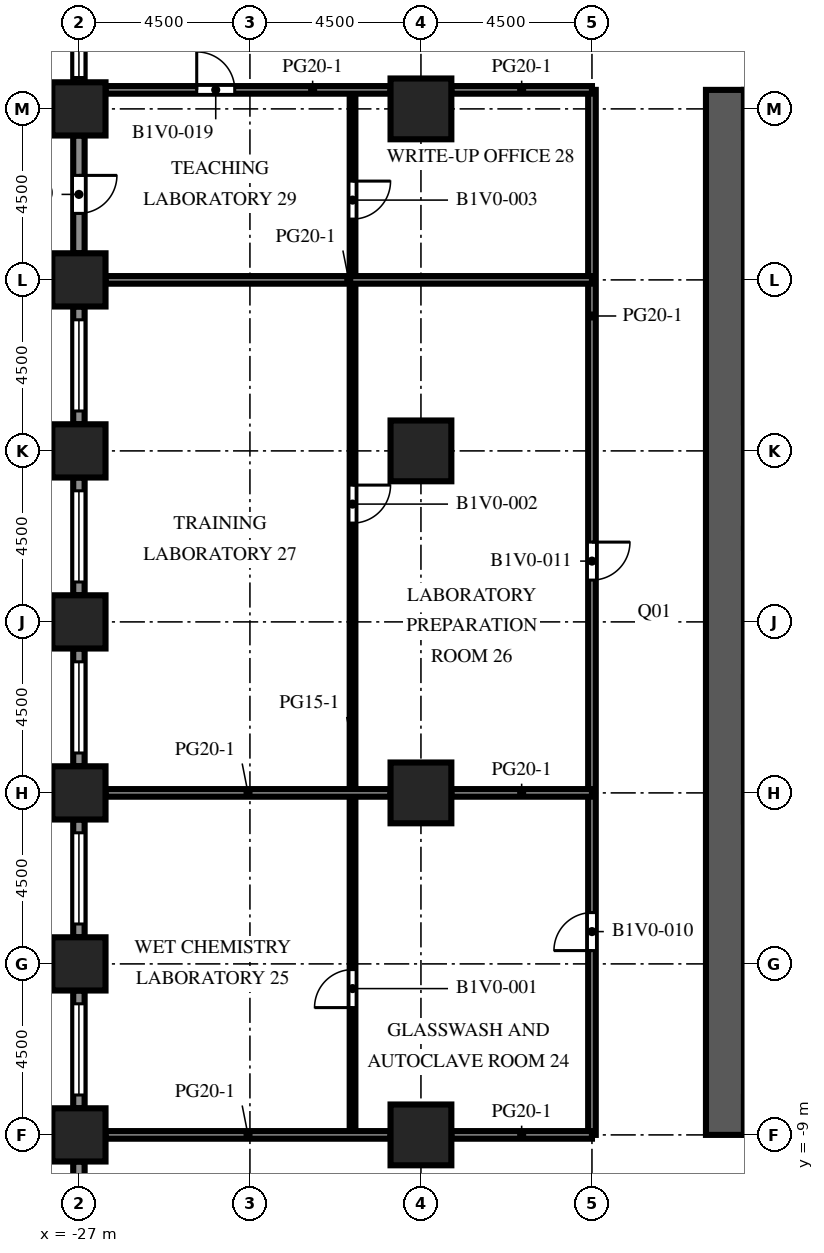
"""IFC4 building model, lengths in metres.
Left out: names, types, materials, properties, quantities, classifications, styles, units other than length and angle.
Written with IfcOpenShell. Run it as: python <this file> out.ifc"""

import sys

from ifc_helpers import new_model, si_unit, direction, frame, frame_2d, origin, origin_2d, place, context, subcontext, project, spatial, rectangle, extrude, element, fill, save


model = new_model("IFC4")
c1 = context("Model", 3, precision=1e-05, world=origin(), true_north=direction((0.0, 1.0)))
c2 = subcontext(c1, "Body", "Model", "MODEL_VIEW")
j1 = project(units=[si_unit("LENGTHUNIT", "METRE"), si_unit("PLANEANGLEUNIT", "RADIAN")], contexts=[c1])
p1 = place(None, origin())
s1 = spatial("IfcSite", under=j1, at=p1, CompositionType="ELEMENT")
p2 = place(p1, origin())
s2 = spatial("IfcBuilding", under=s1, at=p2, CompositionType="ELEMENT")
p3 = place(p2, frame((0.0, 0.0, 11.3)))
s3 = spatial("IfcBuildingStorey", under=s2, at=p3, CompositionType="ELEMENT", Elevation=11.3)
for number, where, z_axis, x_axis in (
    (1, (-27.0, -9.0, 0.0), (0.0, 0.0, 1.0), (1.0, 0.0, 0.0)),
    (2, (-27.0, -4.5, 0.0), (0.0, 0.0, 1.0), (1.0, 0.0, 0.0)),
    (3, (-27.0, 0.0, 0.0), (0.0, 0.0, 1.0), (1.0, 0.0, 0.0)),
    (4, (-27.0, 4.5, 0.0), (0.0, 0.0, 1.0), (1.0, 0.0, 0.0)),
    (5, (-27.0, 9.0, 0.0), (0.0, 0.0, 1.0), (1.0, 0.0, 0.0)),
    (6, (-27.0, 13.5, 0.0), (0.0, 0.0, 1.0), (1.0, 0.0, 0.0)),
    (7, (-27.0, 18.0, 0.0), (0.0, 0.0, 1.0), (1.0, 0.0, 0.0)),
):
    element("IfcColumn", number, at=place(p3, frame(where, z_axis=z_axis, x_axis=x_axis)), inside=s3, PredefinedType="COLUMN", context=c2, shape_type="SweptSolid", body=[
        extrude(rectangle(XDim=1.4, YDim=1.4, at=origin_2d()), origin(), (0.0, 0.0, 1.0), 4.1),
    ])
for number, where, z_axis, x_axis in (
    (8, (-18.0, -9.0, 0.0), (0.0, 0.0, 1.0), (1.0, 0.0, 0.0)),
    (9, (-18.0, 0.0, 0.0), (0.0, 0.0, 1.0), (1.0, 0.0, 0.0)),
    (10, (-18.0, 9.0, 0.0), (0.0, 0.0, 1.0), (1.0, 0.0, 0.0)),
    (11, (-18.0, 18.0, 0.0), (0.0, 0.0, 1.0), (1.0, 0.0, 0.0)),
):
    element("IfcColumn", number, at=place(p3, frame(where, z_axis=z_axis, x_axis=x_axis)), inside=s3, PredefinedType="COLUMN", context=c2, shape_type="SweptSolid", body=[
        extrude(rectangle(XDim=1.6, YDim=1.6, at=origin_2d()), origin(), (0.0, 0.0, 1.0), 4.1),
    ])
p4 = place(p3, frame((-10.0, -9.0, 0.0), z_axis=(0.0, 0.0, 1.0), x_axis=(0.0, 1.0, 0.0)))
e12 = element("IfcWall", 12, at=p4, inside=s3, PredefinedType="SHEAR", context=c2, shape_type="SweptSolid", body=[
    extrude(rectangle(XDim=27.5, YDim=1.0, at=frame_2d((13.75, 0.0))), origin(), (0.0, 0.0, 1.0), 4.1),
])
p5 = place(p4, frame((12.55, 0.0, 0.0)))
e13 = element("IfcOpeningElement", 13, at=p5, cuts=e12, PredefinedType="OPENING", context=c2, shape_type="SweptSolid", body=[
    extrude(rectangle(XDim=2.4, YDim=2.4, at=frame_2d((1.2, 1.2))), frame((0.0, 0.51, 0.0), z_axis=(0.0, -1.0, 0.0), x_axis=(1.0, 0.0, 0.0)), (0.0, 0.0, 1.0), 1.02),
])
p6 = place(p4, frame((6.825, 0.0, 0.0)))
e14 = element("IfcOpeningElement", 14, at=p6, cuts=e12, PredefinedType="OPENING", context=c2, shape_type="SweptSolid", body=[
    extrude(rectangle(XDim=1.2, YDim=2.1, at=frame_2d((0.6, 1.05))), frame((0.0, 0.51, 0.0), z_axis=(0.0, -1.0, 0.0), x_axis=(1.0, 0.0, 0.0)), (0.0, 0.0, 1.0), 1.02),
])
p7 = place(p4, frame((19.475, 0.0, 0.0)))
e15 = element("IfcOpeningElement", 15, at=p7, cuts=e12, PredefinedType="OPENING", context=c2, shape_type="SweptSolid", body=[
    extrude(rectangle(XDim=1.2, YDim=2.1, at=frame_2d((0.6, 1.05))), frame((0.0, 0.51, 0.0), z_axis=(0.0, -1.0, 0.0), x_axis=(1.0, 0.0, 0.0)), (0.0, 0.0, 1.0), 1.02),
])
p8 = place(p3, frame((-27.0, 18.7, 0.0), z_axis=(0.0, 0.0, 1.0), x_axis=(0.0, 1.0, 0.0)))
e16 = element("IfcWall", 16, at=p8, inside=s3, PredefinedType="SOLIDWALL", context=c2, shape_type="SweptSolid", body=[
    extrude(rectangle(XDim=3.1, YDim=0.3, at=frame_2d((1.55, 0.0))), origin(), (0.0, 0.0, 1.0), 2.75),
])
p9 = place(p8, frame((0.125, 0.0, 0.8)))
e17 = element("IfcOpeningElement", 17, at=p9, cuts=e16, PredefinedType="OPENING", context=c2, shape_type="SweptSolid", body=[
    extrude(rectangle(XDim=2.4, YDim=1.7, at=frame_2d((1.2, 0.85))), frame((0.0, 0.16, 0.0), z_axis=(0.0, -1.0, 0.0), x_axis=(1.0, 0.0, 0.0)), (0.0, 0.0, 1.0), 0.32),
])
p10 = place(p3, frame((-27.0, 14.2, 0.0), z_axis=(0.0, 0.0, 1.0), x_axis=(0.0, 1.0, 0.0)))
e18 = element("IfcWall", 18, at=p10, inside=s3, PredefinedType="SOLIDWALL", context=c2, shape_type="SweptSolid", body=[
    extrude(rectangle(XDim=3.1, YDim=0.3, at=frame_2d((1.55, 0.0))), origin(), (0.0, 0.0, 1.0), 2.75),
])
p11 = place(p10, frame((1.05, 0.0, 0.0)))
e19 = element("IfcOpeningElement", 19, at=p11, cuts=e18, PredefinedType="OPENING", context=c2, shape_type="SweptSolid", body=[
    extrude(rectangle(XDim=1.0, YDim=2.2, at=frame_2d((0.5, 1.1))), frame((0.0, 0.16, 0.0), z_axis=(0.0, -1.0, 0.0), x_axis=(1.0, 0.0, 0.0)), (0.0, 0.0, 1.0), 0.32),
])
p12 = place(p3, frame((-27.0, 9.7, 0.0), z_axis=(0.0, 0.0, 1.0), x_axis=(0.0, 1.0, 0.0)))
e20 = element("IfcWall", 20, at=p12, inside=s3, PredefinedType="SOLIDWALL", context=c2, shape_type="SweptSolid", body=[
    extrude(rectangle(XDim=3.1, YDim=0.3, at=frame_2d((1.55, 0.0))), origin(), (0.0, 0.0, 1.0), 2.75),
])
p13 = place(p12, frame((0.35, 0.0, 0.8)))
e21 = element("IfcOpeningElement", 21, at=p13, cuts=e20, PredefinedType="OPENING", context=c2, shape_type="SweptSolid", body=[
    extrude(rectangle(XDim=2.4, YDim=1.7, at=frame_2d((1.2, 0.85))), frame((0.0, 0.16, 0.0), z_axis=(0.0, -1.0, 0.0), x_axis=(1.0, 0.0, 0.0)), (0.0, 0.0, 1.0), 0.32),
])
p14 = place(p3, frame((-27.0, 5.2, 0.0), z_axis=(0.0, 0.0, 1.0), x_axis=(0.0, 1.0, 0.0)))
e22 = element("IfcWall", 22, at=p14, inside=s3, PredefinedType="SOLIDWALL", context=c2, shape_type="SweptSolid", body=[
    extrude(rectangle(XDim=3.1, YDim=0.3, at=frame_2d((1.55, 0.0))), origin(), (0.0, 0.0, 1.0), 2.75),
])
p15 = place(p14, frame((0.35, 0.0, 0.8)))
e23 = element("IfcOpeningElement", 23, at=p15, cuts=e22, PredefinedType="OPENING", context=c2, shape_type="SweptSolid", body=[
    extrude(rectangle(XDim=2.4, YDim=1.7, at=frame_2d((1.2, 0.85))), frame((0.0, 0.16, 0.0), z_axis=(0.0, -1.0, 0.0), x_axis=(1.0, 0.0, 0.0)), (0.0, 0.0, 1.0), 0.32),
])
p16 = place(p3, frame((-27.0, 0.7, 0.0), z_axis=(0.0, 0.0, 1.0), x_axis=(0.0, 1.0, 0.0)))
e24 = element("IfcWall", 24, at=p16, inside=s3, PredefinedType="SOLIDWALL", context=c2, shape_type="SweptSolid", body=[
    extrude(rectangle(XDim=3.1, YDim=0.3, at=frame_2d((1.55, 0.0))), origin(), (0.0, 0.0, 1.0), 2.75),
])
p17 = place(p16, frame((0.35, 0.0, 0.8)))
e25 = element("IfcOpeningElement", 25, at=p17, cuts=e24, PredefinedType="OPENING", context=c2, shape_type="SweptSolid", body=[
    extrude(rectangle(XDim=2.4, YDim=1.7, at=frame_2d((1.2, 0.85))), frame((0.0, 0.16, 0.0), z_axis=(0.0, -1.0, 0.0), x_axis=(1.0, 0.0, 0.0)), (0.0, 0.0, 1.0), 0.32),
])
p18 = place(p3, frame((-27.0, -3.8, 0.0), z_axis=(0.0, 0.0, 1.0), x_axis=(0.0, 1.0, 0.0)))
e26 = element("IfcWall", 26, at=p18, inside=s3, PredefinedType="SOLIDWALL", context=c2, shape_type="SweptSolid", body=[
    extrude(rectangle(XDim=3.1, YDim=0.3, at=frame_2d((1.55, 0.0))), origin(), (0.0, 0.0, 1.0), 2.75),
])
p19 = place(p18, frame((0.35, 0.0, 0.8)))
e27 = element("IfcOpeningElement", 27, at=p19, cuts=e26, PredefinedType="OPENING", context=c2, shape_type="SweptSolid", body=[
    extrude(rectangle(XDim=2.4, YDim=1.7, at=frame_2d((1.2, 0.85))), frame((0.0, 0.16, 0.0), z_axis=(0.0, -1.0, 0.0), x_axis=(1.0, 0.0, 0.0)), (0.0, 0.0, 1.0), 0.32),
])
p20 = place(p3, frame((-27.0, -8.3, 0.0), z_axis=(0.0, 0.0, 1.0), x_axis=(0.0, 1.0, 0.0)))
e28 = element("IfcWall", 28, at=p20, inside=s3, PredefinedType="SOLIDWALL", context=c2, shape_type="SweptSolid", body=[
    extrude(rectangle(XDim=3.1, YDim=0.3, at=frame_2d((1.55, 0.0))), origin(), (0.0, 0.0, 1.0), 2.75),
])
p21 = place(p20, frame((0.35, 0.0, 0.8)))
e29 = element("IfcOpeningElement", 29, at=p21, cuts=e28, PredefinedType="OPENING", context=c2, shape_type="SweptSolid", body=[
    extrude(rectangle(XDim=2.4, YDim=1.7, at=frame_2d((1.2, 0.85))), frame((0.0, 0.16, 0.0), z_axis=(0.0, -1.0, 0.0), x_axis=(1.0, 0.0, 0.0)), (0.0, 0.0, 1.0), 0.32),
])
p22 = place(p3, frame((-27.0, -12.8, 0.0), z_axis=(0.0, 0.0, 1.0), x_axis=(0.0, 1.0, 0.0)))
e30 = element("IfcWall", 30, at=p22, inside=s3, PredefinedType="SOLIDWALL", context=c2, shape_type="SweptSolid", body=[
    extrude(rectangle(XDim=3.1, YDim=0.3, at=frame_2d((1.55, 0.0))), origin(), (0.0, 0.0, 1.0), 2.75),
])
p23 = place(p22, frame((1.425, 0.0, 0.8)))
e31 = element("IfcOpeningElement", 31, at=p23, cuts=e30, PredefinedType="OPENING", context=c2, shape_type="SweptSolid", body=[
    extrude(rectangle(XDim=1.2, YDim=1.7, at=frame_2d((0.6, 0.85))), frame((0.0, 0.16, 0.0), z_axis=(0.0, -1.0, 0.0), x_axis=(1.0, 0.0, 0.0)), (0.0, 0.0, 1.0), 0.32),
])
p24 = place(p3, frame((-19.8, -9.0, 0.0), z_axis=(0.0, 0.0, 1.0), x_axis=(0.0, 1.0, 0.0)))
e32 = element("IfcWall", 32, at=p24, inside=s3, PredefinedType="PARTITIONING", context=c2, shape_type="SweptSolid", body=[
    extrude(rectangle(XDim=27.5, YDim=0.15, at=frame_2d((13.75, 0.0))), origin(), (0.0, 0.0, 1.0), 3.65),
])
p25 = place(p24, frame((3.35, 0.0, 0.0)))
e33 = element("IfcOpeningElement", 33, at=p25, cuts=e32, PredefinedType="OPENING", context=c2, shape_type="SweptSolid", body=[
    extrude(rectangle(XDim=1.0, YDim=2.1, at=frame_2d((0.5, 1.05))), frame((0.0, 0.085, 0.0), z_axis=(0.0, -1.0, 0.0), x_axis=(1.0, 0.0, 0.0)), (0.0, 0.0, 1.0), 0.17),
])
p26 = place(p24, frame((16.1, 0.0, 0.0)))
e34 = element("IfcOpeningElement", 34, at=p26, cuts=e32, PredefinedType="OPENING", context=c2, shape_type="SweptSolid", body=[
    extrude(rectangle(XDim=1.0, YDim=2.1, at=frame_2d((0.5, 1.05))), frame((0.0, 0.085, 0.0), z_axis=(0.0, -1.0, 0.0), x_axis=(1.0, 0.0, 0.0)), (0.0, 0.0, 1.0), 0.17),
])
p27 = place(p24, frame((24.1, 0.0, 0.0)))
e35 = element("IfcOpeningElement", 35, at=p27, cuts=e32, PredefinedType="OPENING", context=c2, shape_type="SweptSolid", body=[
    extrude(rectangle(XDim=1.0, YDim=2.1, at=frame_2d((0.5, 1.05))), frame((0.0, 0.085, 0.0), z_axis=(0.0, -1.0, 0.0), x_axis=(1.0, 0.0, 0.0)), (0.0, 0.0, 1.0), 0.17),
])
p28 = place(p3, frame((-13.5, -9.0, 0.0), z_axis=(0.0, 0.0, 1.0), x_axis=(0.0, 1.0, 0.0)))
e36 = element("IfcWall", 36, at=p28, inside=s3, PredefinedType="PARTITIONING", context=c2, shape_type="SweptSolid", body=[
    extrude(rectangle(XDim=27.5, YDim=0.2, at=frame_2d((13.75, 0.0))), origin(), (0.0, 0.0, 1.0), 3.65),
])
p29 = place(p28, frame((4.85, 0.0, 0.0)))
e37 = element("IfcOpeningElement", 37, at=p29, cuts=e36, PredefinedType="OPENING", context=c2, shape_type="SweptSolid", body=[
    extrude(rectangle(XDim=1.0, YDim=2.1, at=frame_2d((0.5, 1.05))), frame((0.0, 0.11, 0.0), z_axis=(0.0, -1.0, 0.0), x_axis=(1.0, 0.0, 0.0)), (0.0, 0.0, 1.0), 0.22),
])
p30 = place(p28, frame((14.6, 0.0, 0.0)))
e38 = element("IfcOpeningElement", 38, at=p30, cuts=e36, PredefinedType="OPENING", context=c2, shape_type="SweptSolid", body=[
    extrude(rectangle(XDim=1.0, YDim=2.1, at=frame_2d((0.5, 1.05))), frame((0.0, 0.11, 0.0), z_axis=(0.0, -1.0, 0.0), x_axis=(1.0, 0.0, 0.0)), (0.0, 0.0, 1.0), 0.22),
])
p31 = place(p3, frame((-26.3, -9.0, 0.0), z_axis=(0.0, 0.0, 1.0), x_axis=(1.0, 0.0, 0.0)))
e39 = element("IfcWall", 39, at=p31, inside=s3, PredefinedType="PARTITIONING", context=c2, shape_type="SweptSolid", body=[
    extrude(rectangle(XDim=7.5, YDim=0.2, at=frame_2d((3.75, 0.0))), origin(), (0.0, 0.0, 1.0), 3.65),
])
p32 = place(p3, frame((-17.2, -9.0, 0.0), z_axis=(0.0, 0.0, 1.0), x_axis=(1.0, 0.0, 0.0)))
e40 = element("IfcWall", 40, at=p32, inside=s3, PredefinedType="PARTITIONING", context=c2, shape_type="SweptSolid", body=[
    extrude(rectangle(XDim=3.7, YDim=0.2, at=frame_2d((1.85, 0.0))), origin(), (0.0, 0.0, 1.0), 3.65),
])
p33 = place(p3, frame((-26.3, 0.0, 0.0), z_axis=(0.0, 0.0, 1.0), x_axis=(1.0, 0.0, 0.0)))
e41 = element("IfcWall", 41, at=p33, inside=s3, PredefinedType="PARTITIONING", context=c2, shape_type="SweptSolid", body=[
    extrude(rectangle(XDim=7.5, YDim=0.2, at=frame_2d((3.75, 0.0))), origin(), (0.0, 0.0, 1.0), 3.65),
])
p34 = place(p3, frame((-17.2, 0.0, 0.0), z_axis=(0.0, 0.0, 1.0), x_axis=(1.0, 0.0, 0.0)))
e42 = element("IfcWall", 42, at=p34, inside=s3, PredefinedType="PARTITIONING", context=c2, shape_type="SweptSolid", body=[
    extrude(rectangle(XDim=3.7, YDim=0.2, at=frame_2d((1.85, 0.0))), origin(), (0.0, 0.0, 1.0), 3.65),
])
p35 = place(p3, frame((-26.3, 13.5, 0.0), z_axis=(0.0, 0.0, 1.0), x_axis=(1.0, 0.0, 0.0)))
e43 = element("IfcWall", 43, at=p35, inside=s3, PredefinedType="PARTITIONING", context=c2, shape_type="SweptSolid", body=[
    extrude(rectangle(XDim=12.8, YDim=0.2, at=frame_2d((6.4, 0.0))), origin(), (0.0, 0.0, 1.0), 3.65),
])
p36 = place(p3, frame((-18.8, 18.5, 0.0), z_axis=(0.0, 0.0, 1.0), x_axis=(-1.0, 0.0, 0.0)))
e44 = element("IfcWall", 44, at=p36, inside=s3, PredefinedType="PARTITIONING", context=c2, shape_type="SweptSolid", body=[
    extrude(rectangle(XDim=7.5, YDim=0.2, at=frame_2d((3.75, 0.0))), origin(), (0.0, 0.0, 1.0), 3.65),
])
p37 = place(p36, frame((4.1, 0.0, 0.0)))
e45 = element("IfcOpeningElement", 45, at=p37, cuts=e44, PredefinedType="OPENING", context=c2, shape_type="SweptSolid", body=[
    extrude(rectangle(XDim=1.0, YDim=2.1, at=frame_2d((0.5, 1.05))), frame((0.0, 0.11, 0.0), z_axis=(0.0, -1.0, 0.0), x_axis=(1.0, 0.0, 0.0)), (0.0, 0.0, 1.0), 0.22),
])
p38 = place(p3, frame((-17.2, 18.5, 0.0), z_axis=(0.0, 0.0, 1.0), x_axis=(1.0, 0.0, 0.0)))
e46 = element("IfcWall", 46, at=p38, inside=s3, PredefinedType="PARTITIONING", context=c2, shape_type="SweptSolid", body=[
    extrude(rectangle(XDim=3.7, YDim=0.2, at=frame_2d((1.85, 0.0))), origin(), (0.0, 0.0, 1.0), 3.65),
])
p39 = place(p9, origin())
e47 = element("IfcWindow", 47, at=p39, inside=s3, PartitioningType="SINGLE_PANEL", PredefinedType="WINDOW", context=c2, shape_type="SweptSolid", body=[
    extrude(rectangle(XDim=2.4, YDim=1.7, at=frame_2d((1.2, 0.85))), frame((0.0, 0.03, 0.0), z_axis=(0.0, -1.0, 0.0), x_axis=(1.0, 0.0, 0.0)), (0.0, 0.0, 1.0), 0.06),
])
fill(e17, e47)
p40 = place(p11, origin())
e48 = element("IfcDoor", 48, at=p40, inside=s3, OperationType="SINGLE_SWING_RIGHT", PredefinedType="DOOR", context=c2, shape_type="SweptSolid", body=[
    extrude(rectangle(XDim=1.0, YDim=2.2, at=frame_2d((0.5, 1.1))), frame((0.0, 0.025, 0.0), z_axis=(0.0, -1.0, 0.0), x_axis=(1.0, 0.0, 0.0)), (0.0, 0.0, 1.0), 0.05),
])
fill(e19, e48)
p41 = place(p13, origin())
e49 = element("IfcWindow", 49, at=p41, inside=s3, PartitioningType="SINGLE_PANEL", PredefinedType="WINDOW", context=c2, shape_type="SweptSolid", body=[
    extrude(rectangle(XDim=2.4, YDim=1.7, at=frame_2d((1.2, 0.85))), frame((0.0, 0.03, 0.0), z_axis=(0.0, -1.0, 0.0), x_axis=(1.0, 0.0, 0.0)), (0.0, 0.0, 1.0), 0.06),
])
fill(e21, e49)
p42 = place(p15, origin())
e50 = element("IfcWindow", 50, at=p42, inside=s3, PartitioningType="SINGLE_PANEL", PredefinedType="WINDOW", context=c2, shape_type="SweptSolid", body=[
    extrude(rectangle(XDim=2.4, YDim=1.7, at=frame_2d((1.2, 0.85))), frame((0.0, 0.03, 0.0), z_axis=(0.0, -1.0, 0.0), x_axis=(1.0, 0.0, 0.0)), (0.0, 0.0, 1.0), 0.06),
])
fill(e23, e50)
p43 = place(p17, origin())
e51 = element("IfcWindow", 51, at=p43, inside=s3, PartitioningType="SINGLE_PANEL", PredefinedType="WINDOW", context=c2, shape_type="SweptSolid", body=[
    extrude(rectangle(XDim=2.4, YDim=1.7, at=frame_2d((1.2, 0.85))), frame((0.0, 0.03, 0.0), z_axis=(0.0, -1.0, 0.0), x_axis=(1.0, 0.0, 0.0)), (0.0, 0.0, 1.0), 0.06),
])
fill(e25, e51)
p44 = place(p19, origin())
e52 = element("IfcWindow", 52, at=p44, inside=s3, PartitioningType="SINGLE_PANEL", PredefinedType="WINDOW", context=c2, shape_type="SweptSolid", body=[
    extrude(rectangle(XDim=2.4, YDim=1.7, at=frame_2d((1.2, 0.85))), frame((0.0, 0.03, 0.0), z_axis=(0.0, -1.0, 0.0), x_axis=(1.0, 0.0, 0.0)), (0.0, 0.0, 1.0), 0.06),
])
fill(e27, e52)
p45 = place(p21, origin())
e53 = element("IfcWindow", 53, at=p45, inside=s3, PartitioningType="SINGLE_PANEL", PredefinedType="WINDOW", context=c2, shape_type="SweptSolid", body=[
    extrude(rectangle(XDim=2.4, YDim=1.7, at=frame_2d((1.2, 0.85))), frame((0.0, 0.03, 0.0), z_axis=(0.0, -1.0, 0.0), x_axis=(1.0, 0.0, 0.0)), (0.0, 0.0, 1.0), 0.06),
])
fill(e29, e53)
p46 = place(p5, origin())
e54 = element("IfcDoor", 54, at=p46, inside=s3, OperationType="DOUBLE_DOOR_DOUBLE_SWING", PredefinedType="DOOR", context=c2, shape_type="SweptSolid", body=[
    extrude(rectangle(XDim=2.4, YDim=2.4, at=frame_2d((1.2, 1.2))), frame((0.0, 0.025, 0.0), z_axis=(0.0, -1.0, 0.0), x_axis=(1.0, 0.0, 0.0)), (0.0, 0.0, 1.0), 0.05),
])
fill(e13, e54)
p47 = place(p6, origin())
e55 = element("IfcDoor", 55, at=p47, inside=s3, OperationType="SINGLE_SWING_LEFT", PredefinedType="DOOR", context=c2, shape_type="SweptSolid", body=[
    extrude(rectangle(XDim=1.2, YDim=2.1, at=frame_2d((0.6, 1.05))), frame((0.0, 0.025, 0.0), z_axis=(0.0, -1.0, 0.0), x_axis=(1.0, 0.0, 0.0)), (0.0, 0.0, 1.0), 0.05),
])
fill(e14, e55)
p48 = place(p7, origin())
e56 = element("IfcDoor", 56, at=p48, inside=s3, OperationType="SINGLE_SWING_LEFT", PredefinedType="DOOR", context=c2, shape_type="SweptSolid", body=[
    extrude(rectangle(XDim=1.2, YDim=2.1, at=frame_2d((0.6, 1.05))), frame((0.0, 0.025, 0.0), z_axis=(0.0, -1.0, 0.0), x_axis=(1.0, 0.0, 0.0)), (0.0, 0.0, 1.0), 0.05),
])
fill(e15, e56)
p49 = place(p25, origin())
e57 = element("IfcDoor", 57, at=p49, inside=s3, OperationType="SINGLE_SWING_LEFT", PredefinedType="DOOR", context=c2, shape_type="SweptSolid", body=[
    extrude(rectangle(XDim=1.0, YDim=2.1, at=frame_2d((0.5, 1.05))), frame((0.0, 0.025, 0.0), z_axis=(0.0, -1.0, 0.0), x_axis=(1.0, 0.0, 0.0)), (0.0, 0.0, 1.0), 0.05),
])
fill(e33, e57)
p50 = place(p26, origin())
e58 = element("IfcDoor", 58, at=p50, inside=s3, OperationType="SINGLE_SWING_RIGHT", PredefinedType="DOOR", context=c2, shape_type="SweptSolid", body=[
    extrude(rectangle(XDim=1.0, YDim=2.1, at=frame_2d((0.5, 1.05))), frame((0.0, 0.025, 0.0), z_axis=(0.0, -1.0, 0.0), x_axis=(1.0, 0.0, 0.0)), (0.0, 0.0, 1.0), 0.05),
])
fill(e34, e58)
p51 = place(p27, origin())
e59 = element("IfcDoor", 59, at=p51, inside=s3, OperationType="SINGLE_SWING_RIGHT", PredefinedType="DOOR", context=c2, shape_type="SweptSolid", body=[
    extrude(rectangle(XDim=1.0, YDim=2.1, at=frame_2d((0.5, 1.05))), frame((0.0, 0.025, 0.0), z_axis=(0.0, -1.0, 0.0), x_axis=(1.0, 0.0, 0.0)), (0.0, 0.0, 1.0), 0.05),
])
fill(e35, e59)
p52 = place(p29, origin())
e60 = element("IfcDoor", 60, at=p52, inside=s3, OperationType="SINGLE_SWING_LEFT", PredefinedType="DOOR", context=c2, shape_type="SweptSolid", body=[
    extrude(rectangle(XDim=1.0, YDim=2.1, at=frame_2d((0.5, 1.05))), frame((0.0, 0.025, 0.0), z_axis=(0.0, -1.0, 0.0), x_axis=(1.0, 0.0, 0.0)), (0.0, 0.0, 1.0), 0.05),
])
fill(e37, e60)
p53 = place(p30, origin())
e61 = element("IfcDoor", 61, at=p53, inside=s3, OperationType="SINGLE_SWING_RIGHT", PredefinedType="DOOR", context=c2, shape_type="SweptSolid", body=[
    extrude(rectangle(XDim=1.0, YDim=2.1, at=frame_2d((0.5, 1.05))), frame((0.0, 0.025, 0.0), z_axis=(0.0, -1.0, 0.0), x_axis=(1.0, 0.0, 0.0)), (0.0, 0.0, 1.0), 0.05),
])
fill(e38, e61)
p54 = place(p37, origin())
e62 = element("IfcDoor", 62, at=p54, inside=s3, OperationType="SINGLE_SWING_RIGHT", PredefinedType="DOOR", context=c2, shape_type="SweptSolid", body=[
    extrude(rectangle(XDim=1.0, YDim=2.1, at=frame_2d((0.5, 1.05))), frame((0.0, 0.025, 0.0), z_axis=(0.0, -1.0, 0.0), x_axis=(1.0, 0.0, 0.0)), (0.0, 0.0, 1.0), 0.05),
])
fill(e45, e62)
save(model, sys.argv[1])
